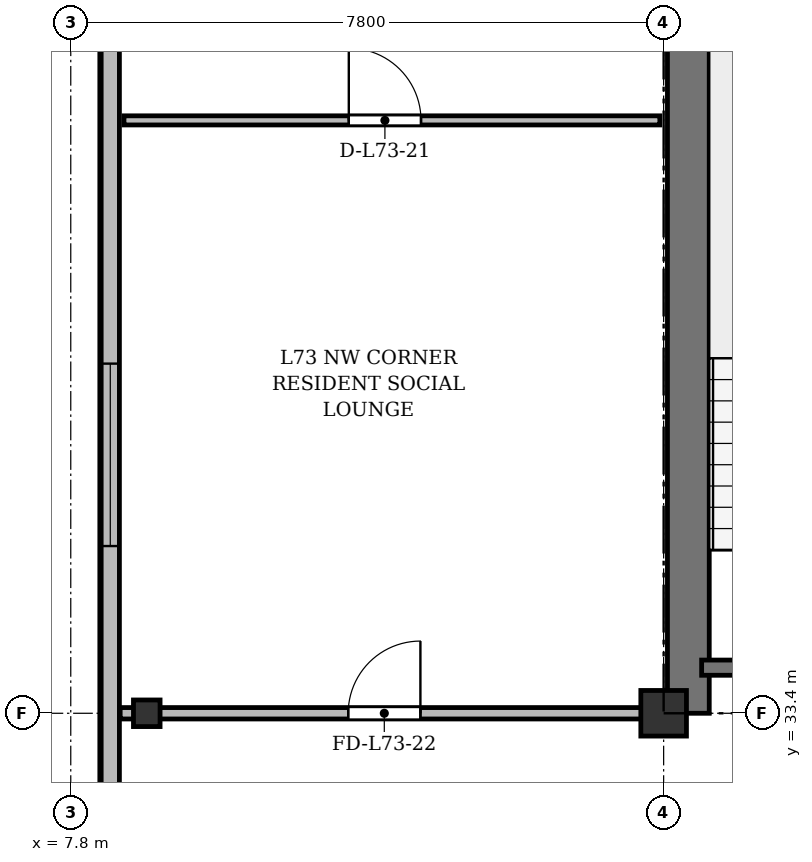
"""IFC4 building model, lengths in metres.
Left out: names, types, materials, properties, quantities, classifications, styles, units other than length and angle.
Written with IfcOpenShell. Run it as: python <this file> out.ifc"""

import sys

from ifc_helpers import new_model, si_unit, direction, frame, frame_2d, origin, origin_2d, place, context, subcontext, project, spatial, rectangle, i_section, extrude, source, transform, mapped, element, fill, save


model = new_model("IFC4")
c1 = context("Model", 3, precision=1e-05, world=origin(), true_north=direction((0.0, 1.0)))
c2 = subcontext(c1, "Body", "Model", "MODEL_VIEW")
j1 = project(units=[si_unit("LENGTHUNIT", "METRE"), si_unit("PLANEANGLEUNIT", "RADIAN")], contexts=[c1])
p1 = place(None, origin())
s1 = spatial("IfcSite", under=j1, at=p1, CompositionType="ELEMENT")
p2 = place(p1, origin())
s2 = spatial("IfcBuilding", under=s1, at=p2, CompositionType="ELEMENT")
p3 = place(p2, frame((0.0, 0.0, 281.1)))
s3 = spatial("IfcBuildingStorey", under=s2, at=p3, CompositionType="ELEMENT", Elevation=281.1)
m1 = source(origin(), c2, "Body", "SweptSolid", [
    extrude(i_section(OverallWidth=0.35, OverallDepth=0.35, WebThickness=0.018, FlangeThickness=0.028, at=origin_2d()), origin(), (0.0, 0.0, 1.0), 3.6),
])
p4 = place(p3, frame((8.8, 33.4, 0.0), z_axis=(0.0, 0.0, 1.0), x_axis=(1.0, 0.0, 0.0)))
e1 = element("IfcColumn", 1, at=p4, inside=s3, PredefinedType="COLUMN", context=c2, shape_type="MappedRepresentation", body=[
    mapped(m1, transform((0.0, 0.0, 0.0), x_axis=(1.0, 0.0, 0.0), y_axis=(0.0, 1.0, 0.0), z_axis=(0.0, 0.0, 1.0), scale=1.0)),
])
m2 = source(origin(), c2, "Body", "SweptSolid", [
    extrude(rectangle(XDim=0.6, YDim=0.6, at=origin_2d()), origin(), (0.0, 0.0, 1.0), 3.6),
])
p5 = place(p3, frame((15.6, 33.4, 0.0), z_axis=(0.0, 0.0, 1.0), x_axis=(1.0, 0.0, 0.0)))
e2 = element("IfcColumn", 2, at=p5, inside=s3, PredefinedType="COLUMN", context=c2, shape_type="MappedRepresentation", body=[
    mapped(m2, transform((0.0, 0.0, 0.0), x_axis=(1.0, 0.0, 0.0), y_axis=(0.0, 1.0, 0.0), z_axis=(0.0, 0.0, 1.0), scale=1.0)),
])
p6 = place(p3, frame((8.32, 6.5, 0.0), z_axis=(0.0, 0.0, 1.0), x_axis=(0.0, 1.0, 0.0)))
e3 = element("IfcWall", 3, at=p6, inside=s3, PredefinedType="SOLIDWALL", context=c2, shape_type="SweptSolid", body=[
    extrude(rectangle(XDim=39.0, YDim=0.24, at=frame_2d((19.5, 0.0))), origin(), (0.0, 0.0, 1.0), 3.37),
])
p7 = place(p6, frame((1.45, 0.0, 0.92)))
e4 = element("IfcOpeningElement", 4, at=p7, cuts=e3, PredefinedType="OPENING", context=c2, shape_type="SweptSolid", body=[
    extrude(rectangle(XDim=1.2, YDim=1.65, at=frame_2d((0.6, 0.825))), frame((0.0, 0.13, 0.0), z_axis=(0.0, -1.0, 0.0), x_axis=(1.0, 0.0, 0.0)), (0.0, 0.0, 1.0), 0.26),
])
p8 = place(p6, frame((3.7, 0.0, 0.92)))
e5 = element("IfcOpeningElement", 5, at=p8, cuts=e3, PredefinedType="OPENING", context=c2, shape_type="SweptSolid", body=[
    extrude(rectangle(XDim=2.4, YDim=2.1, at=frame_2d((1.2, 1.05))), frame((0.0, 0.13, 0.0), z_axis=(0.0, -1.0, 0.0), x_axis=(1.0, 0.0, 0.0)), (0.0, 0.0, 1.0), 0.26),
])
p9 = place(p6, frame((15.1, 0.0, 0.92)))
e6 = element("IfcOpeningElement", 6, at=p9, cuts=e3, PredefinedType="OPENING", context=c2, shape_type="SweptSolid", body=[
    extrude(rectangle(XDim=2.4, YDim=2.1, at=frame_2d((1.2, 1.05))), frame((0.0, 0.13, 0.0), z_axis=(0.0, -1.0, 0.0), x_axis=(1.0, 0.0, 0.0)), (0.0, 0.0, 1.0), 0.26),
])
p10 = place(p6, frame((29.1, 0.0, 0.92)))
e7 = element("IfcOpeningElement", 7, at=p10, cuts=e3, PredefinedType="OPENING", context=c2, shape_type="SweptSolid", body=[
    extrude(rectangle(XDim=2.4, YDim=2.1, at=frame_2d((1.2, 1.05))), frame((0.0, 0.13, 0.0), z_axis=(0.0, -1.0, 0.0), x_axis=(1.0, 0.0, 0.0)), (0.0, 0.0, 1.0), 0.26),
])
p11 = place(p6, frame((36.65, 0.0, 0.92)))
e8 = element("IfcOpeningElement", 8, at=p11, cuts=e3, PredefinedType="OPENING", context=c2, shape_type="SweptSolid", body=[
    extrude(rectangle(XDim=1.2, YDim=1.65, at=frame_2d((0.6, 0.825))), frame((0.0, 0.13, 0.0), z_axis=(0.0, -1.0, 0.0), x_axis=(1.0, 0.0, 0.0)), (0.0, 0.0, 1.0), 0.26),
])
p12 = place(p3, frame((15.925, 33.4, 0.0), z_axis=(0.0, 0.0, 1.0), x_axis=(0.0, 1.0, 0.0)))
e9 = element("IfcWall", 9, at=p12, inside=s3, PredefinedType="SHEAR", context=c2, shape_type="SweptSolid", body=[
    extrude(rectangle(XDim=11.55, YDim=0.55, at=frame_2d((5.775, 0.0))), origin(), (0.0, 0.0, 1.0), 3.37),
])
p13 = place(p3, frame((16.1, 34.0, 0.0), z_axis=(0.0, 0.0, 1.0), x_axis=(1.0, 0.0, 0.0)))
e10 = element("IfcWall", 10, at=p13, inside=s3, PredefinedType="SHEAR", context=c2, shape_type="SweptSolid", body=[
    extrude(rectangle(XDim=3.4, YDim=0.2, at=frame_2d((1.7, 0.0))), origin(), (0.0, 0.0, 1.0), 3.37),
])
p14 = place(p3, frame((8.5, 41.2, 0.0), z_axis=(0.0, 0.0, 1.0), x_axis=(1.0, 0.0, 0.0)))
e11 = element("IfcWall", 11, at=p14, inside=s3, PredefinedType="PARTITIONING", context=c2, shape_type="SweptSolid", body=[
    extrude(rectangle(XDim=7.05, YDim=0.12, at=frame_2d((3.525, 0.0))), origin(), (0.0, 0.0, 1.0), 2.87),
])
p15 = place(p14, frame((2.958, 0.0, 0.0)))
e12 = element("IfcOpeningElement", 12, at=p15, cuts=e11, PredefinedType="OPENING", context=c2, shape_type="SweptSolid", body=[
    extrude(rectangle(XDim=0.95, YDim=2.15, at=frame_2d((0.475, 1.075))), frame((0.0, 0.07, 0.0), z_axis=(0.0, -1.0, 0.0), x_axis=(1.0, 0.0, 0.0)), (0.0, 0.0, 1.0), 0.14),
])
p16 = place(p3, frame((8.45, 33.4, 0.0), z_axis=(0.0, 0.0, 1.0), x_axis=(1.0, 0.0, 0.0)))
e13 = element("IfcWall", 13, at=p16, inside=s3, PredefinedType="PARTITIONING", context=c2, shape_type="SweptSolid", body=[
    extrude(rectangle(XDim=7.15, YDim=0.15, at=frame_2d((3.575, 0.0))), origin(), (0.0, 0.0, 1.0), 2.92),
])
p17 = place(p16, frame((3.0, 0.0, 0.0)))
e14 = element("IfcOpeningElement", 14, at=p17, cuts=e13, PredefinedType="OPENING", context=c2, shape_type="SweptSolid", body=[
    extrude(rectangle(XDim=0.95, YDim=2.15, at=frame_2d((0.475, 1.075))), frame((0.0, 0.085, 0.0), z_axis=(0.0, -1.0, 0.0), x_axis=(1.0, 0.0, 0.0)), (0.0, 0.0, 1.0), 0.17),
])
m3 = source(origin(), c2, "Body", "SweptSolid", [
    extrude(rectangle(XDim=2.4, YDim=2.1, at=frame_2d((1.2, 1.05))), frame((0.0, 0.03, 0.0), z_axis=(0.0, -1.0, 0.0), x_axis=(1.0, 0.0, 0.0)), (0.0, 0.0, 1.0), 0.06),
])
p18 = place(p10, origin())
e15 = element("IfcWindow", 15, at=p18, inside=s3, PartitioningType="SINGLE_PANEL", PredefinedType="WINDOW", context=c2, shape_type="MappedRepresentation", body=[
    mapped(m3, transform((0.0, 0.0, 0.0), x_axis=(1.0, 0.0, 0.0), y_axis=(0.0, 1.0, 0.0), z_axis=(0.0, 0.0, 1.0), scale=1.0)),
])
fill(e7, e15)
m4 = source(origin(), c2, "Body", "SweptSolid", [
    extrude(rectangle(XDim=0.95, YDim=2.15, at=frame_2d((0.475, 1.075))), frame((0.0, 0.025, 0.0), z_axis=(0.0, -1.0, 0.0), x_axis=(1.0, 0.0, 0.0)), (0.0, 0.0, 1.0), 0.05),
])
p19 = place(p15, origin())
e16 = element("IfcDoor", 16, at=p19, inside=s3, OperationType="SINGLE_SWING_LEFT", PredefinedType="DOOR", context=c2, shape_type="MappedRepresentation", body=[
    mapped(m4, transform((0.0, 0.0, 0.0), x_axis=(1.0, 0.0, 0.0), y_axis=(0.0, 1.0, 0.0), z_axis=(0.0, 0.0, 1.0), scale=1.0)),
])
fill(e12, e16)
p20 = place(p17, origin())
e17 = element("IfcDoor", 17, at=p20, inside=s3, OperationType="SINGLE_SWING_RIGHT", PredefinedType="DOOR", context=c2, shape_type="MappedRepresentation", body=[
    mapped(m4, transform((0.0, 0.0, 0.0), x_axis=(1.0, 0.0, 0.0), y_axis=(0.0, 1.0, 0.0), z_axis=(0.0, 0.0, 1.0), scale=1.0)),
])
fill(e14, e17)
save(model, sys.argv[1])
